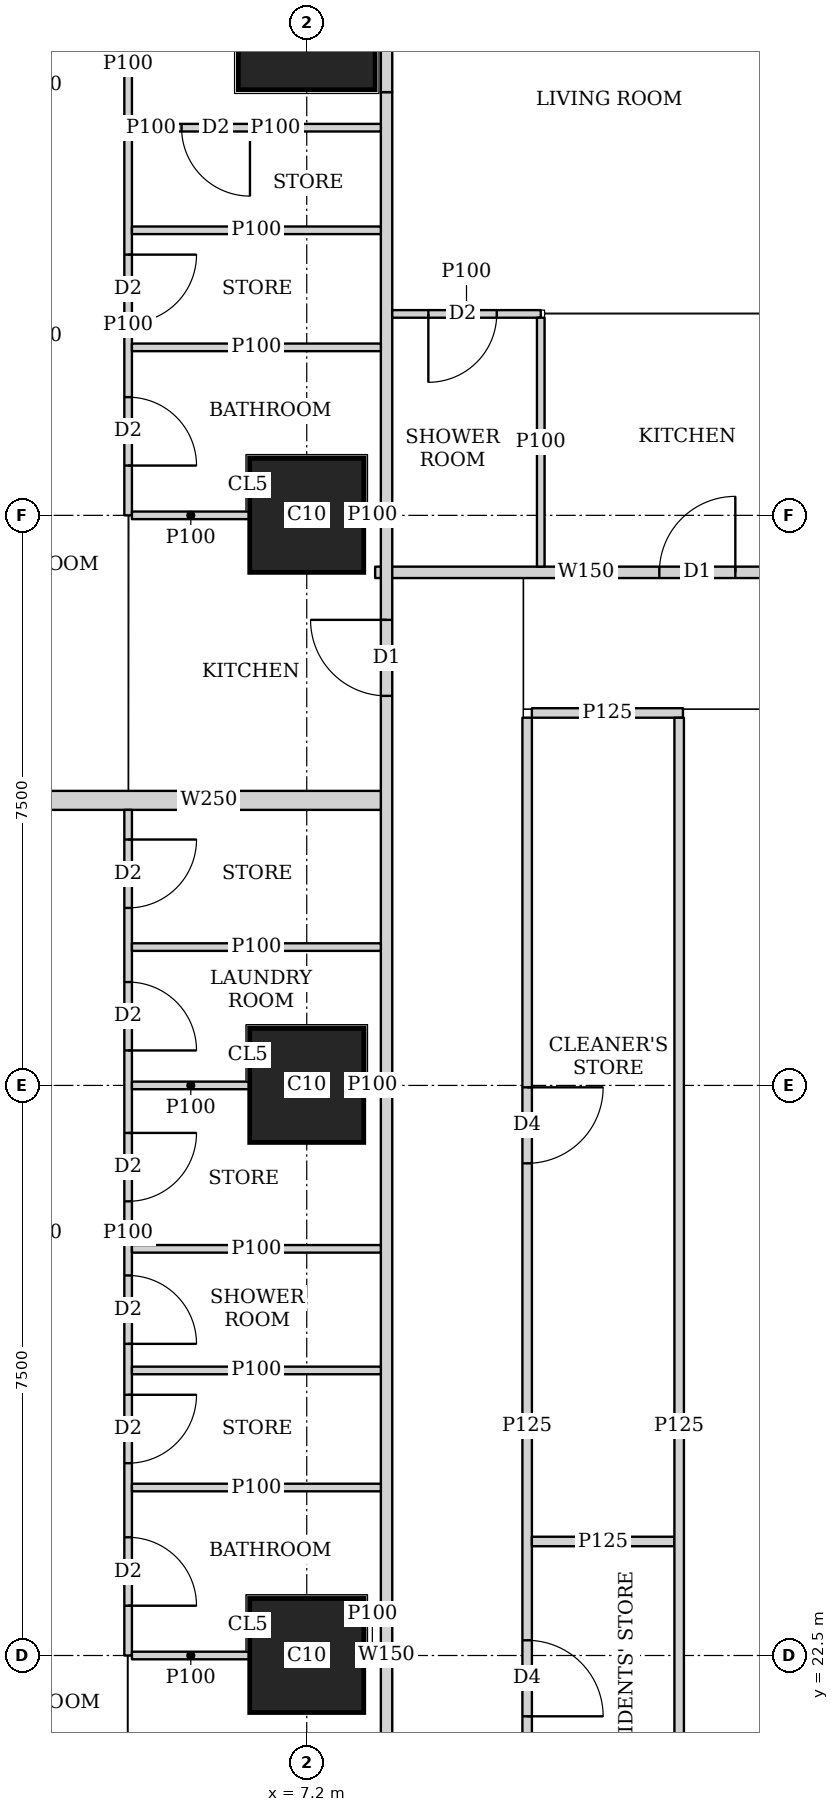
"""IFC4 building model, lengths in metres.
Left out: names, types, materials, properties, quantities, classifications, styles, units other than length and angle.
Written with IfcOpenShell. Run it as: python <this file> out.ifc"""

import sys

from ifc_helpers import new_model, si_unit, direction, frame, frame_2d, origin, origin_2d, place, context, subcontext, project, spatial, rectangle, extrude, element, fill, save


model = new_model("IFC4")
c1 = context("Model", 3, precision=1e-05, world=origin(), true_north=direction((0.0, 1.0)))
c2 = subcontext(c1, "Body", "Model", "MODEL_VIEW")
j1 = project(units=[si_unit("LENGTHUNIT", "METRE"), si_unit("PLANEANGLEUNIT", "RADIAN")], contexts=[c1])
p1 = place(None, origin())
s1 = spatial("IfcSite", under=j1, at=p1, CompositionType="ELEMENT")
p2 = place(p1, origin())
s2 = spatial("IfcBuilding", under=s1, at=p2, CompositionType="ELEMENT")
p3 = place(p2, frame((0.0, 0.0, 147.05)))
s3 = spatial("IfcBuildingStorey", under=s2, at=p3, CompositionType="ELEMENT", Elevation=147.05)
for number, where, z_axis, x_axis in (
    (1, (7.2, 22.5, 0.0), (0.0, 0.0, 1.0), (1.0, 0.0, 0.0)),
    (2, (7.2, 30.0, 0.0), (0.0, 0.0, 1.0), (1.0, 0.0, 0.0)),
    (3, (7.2, 37.5, 0.0), (0.0, 0.0, 1.0), (1.0, 0.0, 0.0)),
):
    element("IfcColumn", number, at=place(p3, frame(where, z_axis=z_axis, x_axis=x_axis)), inside=s3, PredefinedType="COLUMN", context=c2, shape_type="SweptSolid", body=[
        extrude(rectangle(XDim=1.5, YDim=1.5, at=origin_2d()), origin(), (0.0, 0.0, 1.0), 3.75),
    ])
p4 = place(p3, frame((7.2, 44.0, 0.0), z_axis=(0.0, 0.0, 1.0), x_axis=(1.0, 0.0, 0.0)))
e4 = element("IfcColumn", 4, at=p4, inside=s3, PredefinedType="COLUMN", context=c2, shape_type="SweptSolid", body=[
    extrude(rectangle(XDim=1.8, YDim=1.8, at=origin_2d()), origin(), (0.0, 0.0, 1.0), 3.75),
])
p5 = place(p3, frame((8.25, 1.957, 0.0), z_axis=(0.0, 0.0, 1.0), x_axis=(0.0, 1.0, 0.0)))
e5 = element("IfcWall", 5, at=p5, inside=s3, PredefinedType="SOLIDWALL", context=c2, shape_type="SweptSolid", body=[
    extrude(rectangle(XDim=41.111, YDim=0.15, at=frame_2d((20.556, 0.0))), origin(), (0.0, 0.0, 1.0), 3.5),
])
p6 = place(p5, frame((14.418, 0.0, 0.0)))
e6 = element("IfcOpeningElement", 6, at=p6, cuts=e5, PredefinedType="OPENING", context=c2, shape_type="SweptSolid", body=[
    extrude(rectangle(XDim=1.0, YDim=2.1, at=frame_2d((0.5, 1.05))), frame((0.0, 0.085, 0.0), z_axis=(0.0, -1.0, 0.0), x_axis=(1.0, 0.0, 0.0)), (0.0, 0.0, 1.0), 0.17),
])
p7 = place(p5, frame((18.168, 0.0, 0.0)))
e7 = element("IfcOpeningElement", 7, at=p7, cuts=e5, PredefinedType="OPENING", context=c2, shape_type="SweptSolid", body=[
    extrude(rectangle(XDim=1.0, YDim=2.1, at=frame_2d((0.5, 1.05))), frame((0.0, 0.085, 0.0), z_axis=(0.0, -1.0, 0.0), x_axis=(1.0, 0.0, 0.0)), (0.0, 0.0, 1.0), 0.17),
])
p8 = place(p5, frame((33.168, 0.0, 0.0)))
e8 = element("IfcOpeningElement", 8, at=p8, cuts=e5, PredefinedType="OPENING", context=c2, shape_type="SweptSolid", body=[
    extrude(rectangle(XDim=1.0, YDim=2.1, at=frame_2d((0.5, 1.05))), frame((0.0, 0.085, 0.0), z_axis=(0.0, -1.0, 0.0), x_axis=(1.0, 0.0, 0.0)), (0.0, 0.0, 1.0), 0.17),
])
p9 = place(p3, frame((8.25, 43.068, 0.0), z_axis=(0.0, 0.0, 1.0), x_axis=(0.0, 1.0, 0.0)))
e9 = element("IfcWall", 9, at=p9, inside=s3, PredefinedType="SOLIDWALL", context=c2, shape_type="SweptSolid", body=[
    extrude(rectangle(XDim=1.805, YDim=0.15, at=frame_2d((0.902, 0.0))), origin(), (0.0, 0.0, 1.0), 2.1),
])
p10 = place(p3, frame((8.1, 36.75, 0.0), z_axis=(0.0, 0.0, 1.0), x_axis=(1.0, 0.0, 0.0)))
e10 = element("IfcWall", 10, at=p10, inside=s3, PredefinedType="SOLIDWALL", context=c2, shape_type="SweptSolid", body=[
    extrude(rectangle(XDim=5.549, YDim=0.15, at=frame_2d((2.774, 0.0))), origin(), (0.0, 0.0, 1.0), 3.5),
])
p11 = place(p10, frame((3.739, 0.0, 0.0)))
e11 = element("IfcOpeningElement", 11, at=p11, cuts=e10, PredefinedType="OPENING", context=c2, shape_type="SweptSolid", body=[
    extrude(rectangle(XDim=1.0, YDim=2.1, at=frame_2d((0.5, 1.05))), frame((0.0, 0.085, 0.0), z_axis=(0.0, -1.0, 0.0), x_axis=(1.0, 0.0, 0.0)), (0.0, 0.0, 1.0), 0.17),
])
p12 = place(p3, frame((4.85, 22.5, 0.0), z_axis=(0.0, 0.0, 1.0), x_axis=(0.0, 1.0, 0.0)))
e12 = element("IfcWall", 12, at=p12, inside=s3, PredefinedType="PARTITIONING", context=c2, shape_type="SweptSolid", body=[
    extrude(rectangle(XDim=11.125, YDim=0.1, at=frame_2d((5.562, 0.0))), origin(), (0.0, 0.0, 1.0), 3.5),
])
p13 = place(p12, frame((0.655, 0.0, 0.0)))
e13 = element("IfcOpeningElement", 13, at=p13, cuts=e12, PredefinedType="OPENING", context=c2, shape_type="SweptSolid", body=[
    extrude(rectangle(XDim=0.9, YDim=2.1, at=frame_2d((0.45, 1.05))), frame((0.0, 0.06, 0.0), z_axis=(0.0, -1.0, 0.0), x_axis=(1.0, 0.0, 0.0)), (0.0, 0.0, 1.0), 0.12),
])
p14 = place(p12, frame((4.1, 0.0, 0.0)))
e14 = element("IfcOpeningElement", 14, at=p14, cuts=e12, PredefinedType="OPENING", context=c2, shape_type="SweptSolid", body=[
    extrude(rectangle(XDim=0.9, YDim=2.1, at=frame_2d((0.45, 1.05))), frame((0.0, 0.06, 0.0), z_axis=(0.0, -1.0, 0.0), x_axis=(1.0, 0.0, 0.0)), (0.0, 0.0, 1.0), 0.12),
])
p15 = place(p12, frame((7.96, 0.0, 0.0)))
e15 = element("IfcOpeningElement", 15, at=p15, cuts=e12, PredefinedType="OPENING", context=c2, shape_type="SweptSolid", body=[
    extrude(rectangle(XDim=0.9, YDim=2.1, at=frame_2d((0.45, 1.05))), frame((0.0, 0.06, 0.0), z_axis=(0.0, -1.0, 0.0), x_axis=(1.0, 0.0, 0.0)), (0.0, 0.0, 1.0), 0.12),
])
p16 = place(p12, frame((2.53, 0.0, 0.0)))
e16 = element("IfcOpeningElement", 16, at=p16, cuts=e12, PredefinedType="OPENING", context=c2, shape_type="SweptSolid", body=[
    extrude(rectangle(XDim=0.9, YDim=2.1, at=frame_2d((0.45, 1.05))), frame((0.0, 0.06, 0.0), z_axis=(0.0, -1.0, 0.0), x_axis=(1.0, 0.0, 0.0)), (0.0, 0.0, 1.0), 0.12),
])
p17 = place(p12, frame((5.975, 0.0, 0.0)))
e17 = element("IfcOpeningElement", 17, at=p17, cuts=e12, PredefinedType="OPENING", context=c2, shape_type="SweptSolid", body=[
    extrude(rectangle(XDim=0.9, YDim=2.1, at=frame_2d((0.45, 1.05))), frame((0.0, 0.06, 0.0), z_axis=(0.0, -1.0, 0.0), x_axis=(1.0, 0.0, 0.0)), (0.0, 0.0, 1.0), 0.12),
])
p18 = place(p12, frame((9.835, 0.0, 0.0)))
e18 = element("IfcOpeningElement", 18, at=p18, cuts=e12, PredefinedType="OPENING", context=c2, shape_type="SweptSolid", body=[
    extrude(rectangle(XDim=0.9, YDim=2.1, at=frame_2d((0.45, 1.05))), frame((0.0, 0.06, 0.0), z_axis=(0.0, -1.0, 0.0), x_axis=(1.0, 0.0, 0.0)), (0.0, 0.0, 1.0), 0.12),
])
p19 = place(p3, frame((4.9, 22.5, 0.0), z_axis=(0.0, 0.0, 1.0), x_axis=(1.0, 0.0, 0.0)))
e19 = element("IfcWall", 19, at=p19, inside=s3, PredefinedType="PARTITIONING", context=c2, shape_type="SweptSolid", body=[
    extrude(rectangle(XDim=1.549, YDim=0.1, at=frame_2d((0.774, 0.0))), origin(), (0.0, 0.0, 1.0), 3.5),
])
p20 = place(p3, frame((7.951, 22.5, 0.0), z_axis=(0.0, 0.0, 1.0), x_axis=(1.0, 0.0, 0.0)))
e20 = element("IfcWall", 20, at=p20, inside=s3, PredefinedType="PARTITIONING", context=c2, shape_type="SweptSolid", body=[
    extrude(rectangle(XDim=0.224, YDim=0.1, at=frame_2d((0.112, 0.0))), origin(), (0.0, 0.0, 1.0), 3.5),
])
p21 = place(p3, frame((4.9, 26.25, 0.0), z_axis=(0.0, 0.0, 1.0), x_axis=(1.0, 0.0, 0.0)))
e21 = element("IfcWall", 21, at=p21, inside=s3, PredefinedType="PARTITIONING", context=c2, shape_type="SweptSolid", body=[
    extrude(rectangle(XDim=3.275, YDim=0.1, at=frame_2d((1.638, 0.0))), origin(), (0.0, 0.0, 1.0), 3.5),
])
p22 = place(p3, frame((4.9, 30.0, 0.0), z_axis=(0.0, 0.0, 1.0), x_axis=(1.0, 0.0, 0.0)))
e22 = element("IfcWall", 22, at=p22, inside=s3, PredefinedType="PARTITIONING", context=c2, shape_type="SweptSolid", body=[
    extrude(rectangle(XDim=1.549, YDim=0.1, at=frame_2d((0.774, 0.0))), origin(), (0.0, 0.0, 1.0), 3.5),
])
p23 = place(p3, frame((7.951, 30.0, 0.0), z_axis=(0.0, 0.0, 1.0), x_axis=(1.0, 0.0, 0.0)))
e23 = element("IfcWall", 23, at=p23, inside=s3, PredefinedType="PARTITIONING", context=c2, shape_type="SweptSolid", body=[
    extrude(rectangle(XDim=0.224, YDim=0.1, at=frame_2d((0.112, 0.0))), origin(), (0.0, 0.0, 1.0), 3.5),
])
for number, where, z_axis, x_axis in (
    (24, (4.9, 24.71, 0.0), (0.0, 0.0, 1.0), (1.0, 0.0, 0.0)),
    (25, (4.9, 27.85, 0.0), (0.0, 0.0, 1.0), (1.0, 0.0, 0.0)),
    (26, (4.9, 31.82, 0.0), (0.0, 0.0, 1.0), (1.0, 0.0, 0.0)),
):
    element("IfcWall", number, at=place(p3, frame(where, z_axis=z_axis, x_axis=x_axis)), inside=s3, PredefinedType="PARTITIONING", context=c2, shape_type="SweptSolid", body=[
        extrude(rectangle(XDim=3.275, YDim=0.1, at=frame_2d((1.638, 0.0))), origin(), (0.0, 0.0, 1.0), 3.5),
    ])
p24 = place(p3, frame((4.85, 37.5, 0.0), z_axis=(0.0, 0.0, 1.0), x_axis=(0.0, 1.0, 0.0)))
e27 = element("IfcWall", 27, at=p24, inside=s3, PredefinedType="PARTITIONING", context=c2, shape_type="SweptSolid", body=[
    extrude(rectangle(XDim=5.007, YDim=0.1, at=frame_2d((2.503, 0.0))), origin(), (0.0, 0.0, 1.0), 3.5),
])
p25 = place(p24, frame((0.655, 0.0, 0.0)))
e28 = element("IfcOpeningElement", 28, at=p25, cuts=e27, PredefinedType="OPENING", context=c2, shape_type="SweptSolid", body=[
    extrude(rectangle(XDim=0.9, YDim=2.1, at=frame_2d((0.45, 1.05))), frame((0.0, 0.06, 0.0), z_axis=(0.0, -1.0, 0.0), x_axis=(1.0, 0.0, 0.0)), (0.0, 0.0, 1.0), 0.12),
])
p26 = place(p24, frame((2.53, 0.0, 0.0)))
e29 = element("IfcOpeningElement", 29, at=p26, cuts=e27, PredefinedType="OPENING", context=c2, shape_type="SweptSolid", body=[
    extrude(rectangle(XDim=0.9, YDim=2.1, at=frame_2d((0.45, 1.05))), frame((0.0, 0.06, 0.0), z_axis=(0.0, -1.0, 0.0), x_axis=(1.0, 0.0, 0.0)), (0.0, 0.0, 1.0), 0.12),
])
p27 = place(p3, frame((4.85, 42.507, 0.0), z_axis=(0.0, 0.0, 1.0), x_axis=(0.0, 1.0, 0.0)))
e30 = element("IfcWall", 30, at=p27, inside=s3, PredefinedType="PARTITIONING", context=c2, shape_type="SweptSolid", body=[
    extrude(rectangle(XDim=1.874, YDim=0.1, at=frame_2d((0.937, 0.0))), origin(), (0.0, 0.0, 1.0), 2.1),
])
p28 = place(p3, frame((4.9, 37.5, 0.0), z_axis=(0.0, 0.0, 1.0), x_axis=(1.0, 0.0, 0.0)))
e31 = element("IfcWall", 31, at=p28, inside=s3, PredefinedType="PARTITIONING", context=c2, shape_type="SweptSolid", body=[
    extrude(rectangle(XDim=1.549, YDim=0.1, at=frame_2d((0.774, 0.0))), origin(), (0.0, 0.0, 1.0), 3.5),
])
p29 = place(p3, frame((7.951, 37.5, 0.0), z_axis=(0.0, 0.0, 1.0), x_axis=(1.0, 0.0, 0.0)))
e32 = element("IfcWall", 32, at=p29, inside=s3, PredefinedType="PARTITIONING", context=c2, shape_type="SweptSolid", body=[
    extrude(rectangle(XDim=0.224, YDim=0.1, at=frame_2d((0.112, 0.0))), origin(), (0.0, 0.0, 1.0), 3.5),
])
for number, where, z_axis, x_axis in (
    (33, (4.9, 41.25, 0.0), (0.0, 0.0, 1.0), (1.0, 0.0, 0.0)),
    (34, (4.9, 39.71, 0.0), (0.0, 0.0, 1.0), (1.0, 0.0, 0.0)),
):
    element("IfcWall", number, at=place(p3, frame(where, z_axis=z_axis, x_axis=x_axis)), inside=s3, PredefinedType="PARTITIONING", context=c2, shape_type="SweptSolid", body=[
        extrude(rectangle(XDim=3.275, YDim=0.1, at=frame_2d((1.638, 0.0))), origin(), (0.0, 0.0, 1.0), 3.5),
    ])
p30 = place(p3, frame((3.65, 33.75, 0.0), z_axis=(0.0, 0.0, 1.0), x_axis=(1.0, 0.0, 0.0)))
e35 = element("IfcWall", 35, at=p30, inside=s3, PredefinedType="SOLIDWALL", context=c2, shape_type="SweptSolid", body=[
    extrude(rectangle(XDim=4.525, YDim=0.25, at=frame_2d((2.263, 0.0))), origin(), (0.0, 0.0, 1.0), 3.5),
])
p31 = place(p3, frame((8.325, 40.15, 0.0), z_axis=(0.0, 0.0, 1.0), x_axis=(1.0, 0.0, 0.0)))
e36 = element("IfcWall", 36, at=p31, inside=s3, PredefinedType="PARTITIONING", context=c2, shape_type="SweptSolid", body=[
    extrude(rectangle(XDim=1.954, YDim=0.1, at=frame_2d((0.977, 0.0))), origin(), (0.0, 0.0, 1.0), 3.5),
])
p32 = place(p31, frame((0.475, 0.0, 0.0)))
e37 = element("IfcOpeningElement", 37, at=p32, cuts=e36, PredefinedType="OPENING", context=c2, shape_type="SweptSolid", body=[
    extrude(rectangle(XDim=0.9, YDim=2.1, at=frame_2d((0.45, 1.05))), frame((0.0, 0.06, 0.0), z_axis=(0.0, -1.0, 0.0), x_axis=(1.0, 0.0, 0.0)), (0.0, 0.0, 1.0), 0.12),
])
p33 = place(p3, frame((10.279, 36.825, 0.0), z_axis=(0.0, 0.0, 1.0), x_axis=(0.0, 1.0, 0.0)))
e38 = element("IfcWall", 38, at=p33, inside=s3, PredefinedType="PARTITIONING", context=c2, shape_type="SweptSolid", body=[
    extrude(rectangle(XDim=3.275, YDim=0.1, at=frame_2d((1.638, 0.0))), origin(), (0.0, 0.0, 1.0), 3.5),
])
p34 = place(p3, frame((4.9, 42.6, 0.0), z_axis=(0.0, 0.0, 1.0), x_axis=(1.0, 0.0, 0.0)))
e39 = element("IfcWall", 39, at=p34, inside=s3, PredefinedType="PARTITIONING", context=c2, shape_type="SweptSolid", body=[
    extrude(rectangle(XDim=0.503, YDim=0.1, at=frame_2d((0.251, 0.0))), origin(), (0.0, 0.0, 1.0), 2.1),
])
p35 = place(p3, frame((5.403, 42.6, 0.0), z_axis=(0.0, 0.0, 1.0), x_axis=(1.0, 0.0, 0.0)))
e40 = element("IfcWall", 40, at=p35, inside=s3, PredefinedType="PARTITIONING", context=c2, shape_type="SweptSolid", body=[
    extrude(rectangle(XDim=2.772, YDim=0.1, at=frame_2d((1.386, 0.0))), origin(), (0.0, 0.0, 1.0), 3.5),
])
p36 = place(p35, frame((0.15, 0.0, 0.0)))
e41 = element("IfcOpeningElement", 41, at=p36, cuts=e40, PredefinedType="OPENING", context=c2, shape_type="SweptSolid", body=[
    extrude(rectangle(XDim=0.9, YDim=2.1, at=frame_2d((0.45, 1.05))), frame((0.0, 0.06, 0.0), z_axis=(0.0, -1.0, 0.0), x_axis=(1.0, 0.0, 0.0)), (0.0, 0.0, 1.0), 0.12),
])
p37 = place(p3, frame((10.1, 16.2, 0.0), z_axis=(0.0, 0.0, 1.0), x_axis=(0.0, 1.0, 0.0)))
e42 = element("IfcWall", 42, at=p37, inside=s3, PredefinedType="PARTITIONING", context=c2, shape_type="SweptSolid", body=[
    extrude(rectangle(XDim=18.638, YDim=0.125, at=frame_2d((9.319, 0.0))), origin(), (0.0, 0.0, 1.0), 3.5),
])
p38 = place(p37, frame((1.6, 0.0, 0.0)))
e43 = element("IfcOpeningElement", 43, at=p38, cuts=e42, PredefinedType="OPENING", context=c2, shape_type="SweptSolid", body=[
    extrude(rectangle(XDim=1.0, YDim=2.1, at=frame_2d((0.5, 1.05))), frame((0.0, 0.073, 0.0), z_axis=(0.0, -1.0, 0.0), x_axis=(1.0, 0.0, 0.0)), (0.0, 0.0, 1.0), 0.145),
])
p39 = place(p37, frame((5.5, 0.0, 0.0)))
e44 = element("IfcOpeningElement", 44, at=p39, cuts=e42, PredefinedType="OPENING", context=c2, shape_type="SweptSolid", body=[
    extrude(rectangle(XDim=1.0, YDim=2.1, at=frame_2d((0.5, 1.05))), frame((0.0, 0.073, 0.0), z_axis=(0.0, -1.0, 0.0), x_axis=(1.0, 0.0, 0.0)), (0.0, 0.0, 1.0), 0.145),
])
p40 = place(p37, frame((12.775, 0.0, 0.0)))
e45 = element("IfcOpeningElement", 45, at=p40, cuts=e42, PredefinedType="OPENING", context=c2, shape_type="SweptSolid", body=[
    extrude(rectangle(XDim=1.0, YDim=2.1, at=frame_2d((0.5, 1.05))), frame((0.0, 0.073, 0.0), z_axis=(0.0, -1.0, 0.0), x_axis=(1.0, 0.0, 0.0)), (0.0, 0.0, 1.0), 0.145),
])
p41 = place(p3, frame((10.162, 24.0, 0.0), z_axis=(0.0, 0.0, 1.0), x_axis=(1.0, 0.0, 0.0)))
e46 = element("IfcWall", 46, at=p41, inside=s3, PredefinedType="PARTITIONING", context=c2, shape_type="SweptSolid", body=[
    extrude(rectangle(XDim=1.875, YDim=0.125, at=frame_2d((0.938, 0.0))), origin(), (0.0, 0.0, 1.0), 3.5),
])
p42 = place(p3, frame((12.1, 16.2, 0.0), z_axis=(0.0, 0.0, 1.0), x_axis=(0.0, 1.0, 0.0)))
e47 = element("IfcWall", 47, at=p42, inside=s3, PredefinedType="PARTITIONING", context=c2, shape_type="SweptSolid", body=[
    extrude(rectangle(XDim=18.637, YDim=0.125, at=frame_2d((9.318, 0.0))), origin(), (0.0, 0.0, 1.0), 3.5),
])
p43 = place(p3, frame((10.162, 34.9, 0.0), z_axis=(0.0, 0.0, 1.0), x_axis=(1.0, 0.0, 0.0)))
e48 = element("IfcWall", 48, at=p43, inside=s3, PredefinedType="PARTITIONING", context=c2, shape_type="SweptSolid", body=[
    extrude(rectangle(XDim=1.988, YDim=0.125, at=frame_2d((0.994, 0.0))), origin(), (0.0, 0.0, 1.0), 3.5),
])
p44 = place(p13, origin())
e49 = element("IfcDoor", 49, at=p44, inside=s3, OperationType="SINGLE_SWING_RIGHT", PredefinedType="DOOR", context=c2, shape_type="SweptSolid", body=[
    extrude(rectangle(XDim=0.9, YDim=2.1, at=frame_2d((0.45, 1.05))), frame((0.0, 0.025, 0.0), z_axis=(0.0, -1.0, 0.0), x_axis=(1.0, 0.0, 0.0)), (0.0, 0.0, 1.0), 0.05),
])
fill(e13, e49)
p45 = place(p14, origin())
e50 = element("IfcDoor", 50, at=p45, inside=s3, OperationType="SINGLE_SWING_RIGHT", PredefinedType="DOOR", context=c2, shape_type="SweptSolid", body=[
    extrude(rectangle(XDim=0.9, YDim=2.1, at=frame_2d((0.45, 1.05))), frame((0.0, 0.025, 0.0), z_axis=(0.0, -1.0, 0.0), x_axis=(1.0, 0.0, 0.0)), (0.0, 0.0, 1.0), 0.05),
])
fill(e14, e50)
p46 = place(p15, origin())
e51 = element("IfcDoor", 51, at=p46, inside=s3, OperationType="SINGLE_SWING_RIGHT", PredefinedType="DOOR", context=c2, shape_type="SweptSolid", body=[
    extrude(rectangle(XDim=0.9, YDim=2.1, at=frame_2d((0.45, 1.05))), frame((0.0, 0.025, 0.0), z_axis=(0.0, -1.0, 0.0), x_axis=(1.0, 0.0, 0.0)), (0.0, 0.0, 1.0), 0.05),
])
fill(e15, e51)
p47 = place(p16, origin())
e52 = element("IfcDoor", 52, at=p47, inside=s3, OperationType="SINGLE_SWING_LEFT", PredefinedType="DOOR", context=c2, shape_type="SweptSolid", body=[
    extrude(rectangle(XDim=0.9, YDim=2.1, at=frame_2d((0.45, 1.05))), frame((0.0, 0.025, 0.0), z_axis=(0.0, -1.0, 0.0), x_axis=(1.0, 0.0, 0.0)), (0.0, 0.0, 1.0), 0.05),
])
fill(e16, e52)
p48 = place(p17, origin())
e53 = element("IfcDoor", 53, at=p48, inside=s3, OperationType="SINGLE_SWING_LEFT", PredefinedType="DOOR", context=c2, shape_type="SweptSolid", body=[
    extrude(rectangle(XDim=0.9, YDim=2.1, at=frame_2d((0.45, 1.05))), frame((0.0, 0.025, 0.0), z_axis=(0.0, -1.0, 0.0), x_axis=(1.0, 0.0, 0.0)), (0.0, 0.0, 1.0), 0.05),
])
fill(e17, e53)
p49 = place(p18, origin())
e54 = element("IfcDoor", 54, at=p49, inside=s3, OperationType="SINGLE_SWING_LEFT", PredefinedType="DOOR", context=c2, shape_type="SweptSolid", body=[
    extrude(rectangle(XDim=0.9, YDim=2.1, at=frame_2d((0.45, 1.05))), frame((0.0, 0.025, 0.0), z_axis=(0.0, -1.0, 0.0), x_axis=(1.0, 0.0, 0.0)), (0.0, 0.0, 1.0), 0.05),
])
fill(e18, e54)
p50 = place(p25, origin())
e55 = element("IfcDoor", 55, at=p50, inside=s3, OperationType="SINGLE_SWING_RIGHT", PredefinedType="DOOR", context=c2, shape_type="SweptSolid", body=[
    extrude(rectangle(XDim=0.9, YDim=2.1, at=frame_2d((0.45, 1.05))), frame((0.0, 0.025, 0.0), z_axis=(0.0, -1.0, 0.0), x_axis=(1.0, 0.0, 0.0)), (0.0, 0.0, 1.0), 0.05),
])
fill(e28, e55)
p51 = place(p26, origin())
e56 = element("IfcDoor", 56, at=p51, inside=s3, OperationType="SINGLE_SWING_LEFT", PredefinedType="DOOR", context=c2, shape_type="SweptSolid", body=[
    extrude(rectangle(XDim=0.9, YDim=2.1, at=frame_2d((0.45, 1.05))), frame((0.0, 0.025, 0.0), z_axis=(0.0, -1.0, 0.0), x_axis=(1.0, 0.0, 0.0)), (0.0, 0.0, 1.0), 0.05),
])
fill(e29, e56)
p52 = place(p8, origin())
e57 = element("IfcDoor", 57, at=p52, inside=s3, OperationType="SINGLE_SWING_RIGHT", PredefinedType="DOOR", context=c2, shape_type="SweptSolid", body=[
    extrude(rectangle(XDim=1.0, YDim=2.1, at=frame_2d((0.5, 1.05))), frame((0.0, 0.025, 0.0), z_axis=(0.0, -1.0, 0.0), x_axis=(1.0, 0.0, 0.0)), (0.0, 0.0, 1.0), 0.05),
])
fill(e8, e57)
p53 = place(p32, origin())
e58 = element("IfcDoor", 58, at=p53, inside=s3, OperationType="SINGLE_SWING_RIGHT", PredefinedType="DOOR", context=c2, shape_type="SweptSolid", body=[
    extrude(rectangle(XDim=0.9, YDim=2.1, at=frame_2d((0.45, 1.05))), frame((0.0, 0.025, 0.0), z_axis=(0.0, -1.0, 0.0), x_axis=(1.0, 0.0, 0.0)), (0.0, 0.0, 1.0), 0.05),
])
fill(e37, e58)
p54 = place(p11, origin())
e59 = element("IfcDoor", 59, at=p54, inside=s3, OperationType="SINGLE_SWING_RIGHT", PredefinedType="DOOR", context=c2, shape_type="SweptSolid", body=[
    extrude(rectangle(XDim=1.0, YDim=2.1, at=frame_2d((0.5, 1.05))), frame((0.0, 0.025, 0.0), z_axis=(0.0, -1.0, 0.0), x_axis=(1.0, 0.0, 0.0)), (0.0, 0.0, 1.0), 0.05),
])
fill(e11, e59)
p55 = place(p36, origin())
e60 = element("IfcDoor", 60, at=p55, inside=s3, OperationType="SINGLE_SWING_LEFT", PredefinedType="DOOR", context=c2, shape_type="SweptSolid", body=[
    extrude(rectangle(XDim=0.9, YDim=2.1, at=frame_2d((0.45, 1.05))), frame((0.0, 0.025, 0.0), z_axis=(0.0, -1.0, 0.0), x_axis=(1.0, 0.0, 0.0)), (0.0, 0.0, 1.0), 0.05),
])
fill(e41, e60)
p56 = place(p39, origin())
e61 = element("IfcDoor", 61, at=p56, inside=s3, OperationType="SINGLE_SWING_RIGHT", PredefinedType="DOOR", context=c2, shape_type="SweptSolid", body=[
    extrude(rectangle(XDim=1.0, YDim=2.1, at=frame_2d((0.5, 1.05))), frame((0.0, 0.025, 0.0), z_axis=(0.0, -1.0, 0.0), x_axis=(1.0, 0.0, 0.0)), (0.0, 0.0, 1.0), 0.05),
])
fill(e44, e61)
p57 = place(p40, origin())
e62 = element("IfcDoor", 62, at=p57, inside=s3, OperationType="SINGLE_SWING_LEFT", PredefinedType="DOOR", context=c2, shape_type="SweptSolid", body=[
    extrude(rectangle(XDim=1.0, YDim=2.1, at=frame_2d((0.5, 1.05))), frame((0.0, 0.025, 0.0), z_axis=(0.0, -1.0, 0.0), x_axis=(1.0, 0.0, 0.0)), (0.0, 0.0, 1.0), 0.05),
])
fill(e45, e62)
save(model, sys.argv[1])
